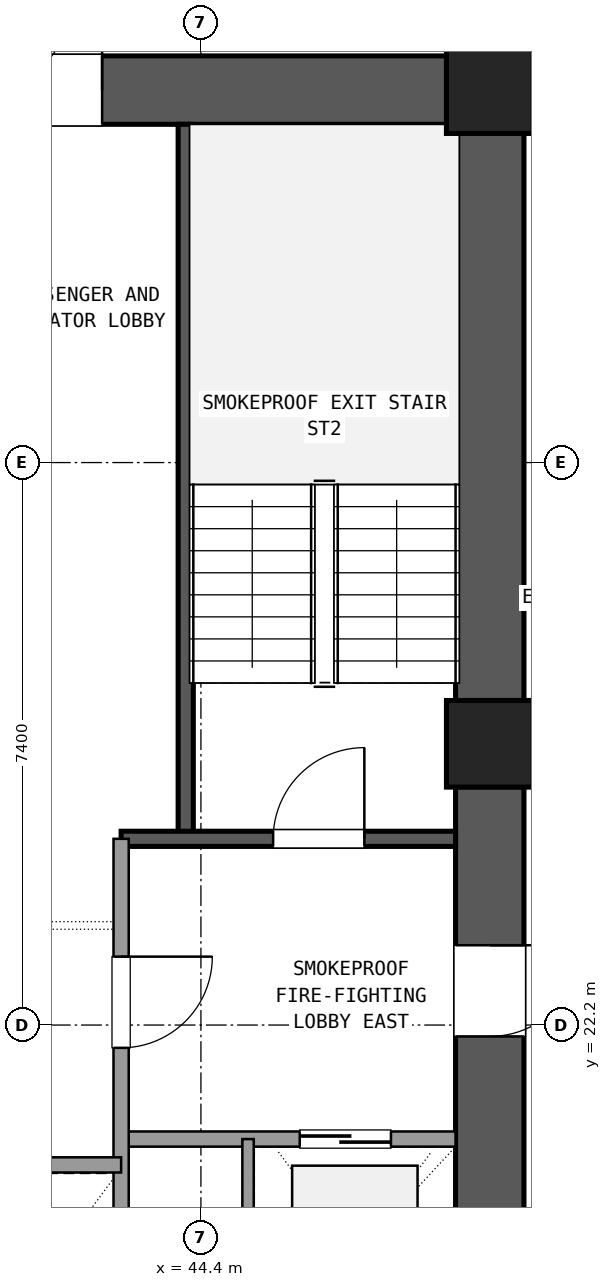
"""IFC4 building model, lengths in metres.
Left out: names, types, materials, properties, quantities, classifications, styles, units other than length and angle.
Written with IfcOpenShell. Run it as: python <this file> out.ifc"""

import sys

from ifc_helpers import new_model, si_unit, direction, frame, frame_2d, origin, origin_2d, place, context, subcontext, project, spatial, rectangle, extrude, element, fill, save


model = new_model("IFC4")
c1 = context("Model", 3, precision=1e-05, world=origin(), true_north=direction((0.0, 1.0)))
c2 = subcontext(c1, "Body", "Model", "MODEL_VIEW")
j1 = project(units=[si_unit("LENGTHUNIT", "METRE"), si_unit("PLANEANGLEUNIT", "RADIAN")], contexts=[c1])
p1 = place(None, origin())
s1 = spatial("IfcSite", under=j1, at=p1, CompositionType="ELEMENT")
p2 = place(p1, origin())
s2 = spatial("IfcBuilding", under=s1, at=p2, CompositionType="ELEMENT")
p3 = place(p2, frame((0.0, 0.0, 63.54)))
s3 = spatial("IfcBuildingStorey", under=s2, at=p3, CompositionType="ELEMENT", Elevation=63.54)
for number, where, z_axis, x_axis in (
    (1, (48.2, 25.9, 0.0), (0.0, 0.0, 1.0), (1.0, 0.0, 0.0)),
    (2, (48.2, 34.5, 0.0), (0.0, 0.0, 1.0), (1.0, 0.0, 0.0)),
):
    element("IfcColumn", number, at=place(p3, frame(where, z_axis=z_axis, x_axis=x_axis)), inside=s3, PredefinedType="COLUMN", context=c2, shape_type="SweptSolid", body=[
        extrude(rectangle(XDim=1.14, YDim=1.14, at=origin_2d()), origin(), (0.0, 0.0, 1.0), 3.6),
    ])
p4 = place(p3, frame((48.2, 17.865, 0.0), z_axis=(0.0, 0.0, 1.0), x_axis=(0.0, 1.0, 0.0)))
e3 = element("IfcWall", 3, at=p4, inside=s3, PredefinedType="SHEAR", context=c2, shape_type="SweptSolid", body=[
    extrude(rectangle(XDim=7.47, YDim=0.9, at=frame_2d((3.735, 0.0))), origin(), (0.0, 0.0, 1.0), 3.32),
])
p5 = place(p4, frame((4.185, 0.0, 0.0)))
e4 = element("IfcOpeningElement", 4, at=p5, cuts=e3, PredefinedType="OPENING", context=c2, shape_type="SweptSolid", body=[
    extrude(rectangle(XDim=1.2, YDim=2.15, at=frame_2d((0.6, 1.075))), frame((0.0, 0.46, 0.0), z_axis=(0.0, -1.0, 0.0), x_axis=(1.0, 0.0, 0.0)), (0.0, 0.0, 1.0), 0.92),
])
p6 = place(p3, frame((48.2, 26.465, 0.0), z_axis=(0.0, 0.0, 1.0), x_axis=(0.0, 1.0, 0.0)))
e5 = element("IfcWall", 5, at=p6, inside=s3, PredefinedType="SHEAR", context=c2, shape_type="SweptSolid", body=[
    extrude(rectangle(XDim=7.47, YDim=0.9, at=frame_2d((3.735, 0.0))), origin(), (0.0, 0.0, 1.0), 3.32),
])
p7 = place(p3, frame((47.635, 34.5, 0.0), z_axis=(0.0, 0.0, 1.0), x_axis=(-1.0, 0.0, 0.0)))
e6 = element("IfcWall", 6, at=p7, inside=s3, PredefinedType="SHEAR", context=c2, shape_type="SweptSolid", body=[
    extrude(rectangle(XDim=10.07, YDim=0.9, at=frame_2d((5.035, 0.0))), origin(), (0.0, 0.0, 1.0), 3.32),
])
p8 = place(p7, frame((4.535, 0.0, 0.0)))
e7 = element("IfcOpeningElement", 7, at=p8, cuts=e6, PredefinedType="OPENING", context=c2, shape_type="SweptSolid", body=[
    extrude(rectangle(XDim=1.6, YDim=2.2, at=frame_2d((0.8, 1.1))), frame((0.0, 0.46, 0.0), z_axis=(0.0, -1.0, 0.0), x_axis=(1.0, 0.0, 0.0)), (0.0, 0.0, 1.0), 0.92),
])
p9 = place(p3, frame((44.2, 24.65, 0.0), z_axis=(0.0, 0.0, 1.0), x_axis=(0.0, 1.0, 0.0)))
e8 = element("IfcWall", 8, at=p9, inside=s3, PredefinedType="SHEAR", context=c2, shape_type="SweptSolid", body=[
    extrude(rectangle(XDim=9.4, YDim=0.2, at=frame_2d((4.7, 0.0))), origin(), (0.0, 0.0, 1.0), 3.32),
])
p10 = place(p3, frame((43.35, 24.65, 0.0), z_axis=(0.0, 0.0, 1.0), x_axis=(1.0, 0.0, 0.0)))
e9 = element("IfcWall", 9, at=p10, inside=s3, PredefinedType="SHEAR", context=c2, shape_type="SweptSolid", body=[
    extrude(rectangle(XDim=4.4, YDim=0.2, at=frame_2d((2.2, 0.0))), origin(), (0.0, 0.0, 1.0), 3.32),
])
p11 = place(p10, frame((2.0, 0.0, 0.0)))
e10 = element("IfcOpeningElement", 10, at=p11, cuts=e9, PredefinedType="OPENING", context=c2, shape_type="SweptSolid", body=[
    extrude(rectangle(XDim=1.2, YDim=2.15, at=frame_2d((0.6, 1.075))), frame((0.0, 0.11, 0.0), z_axis=(0.0, -1.0, 0.0), x_axis=(1.0, 0.0, 0.0)), (0.0, 0.0, 1.0), 0.22),
])
p12 = place(p3, frame((43.35, 20.7, 0.0), z_axis=(0.0, 0.0, 1.0), x_axis=(1.0, 0.0, 0.0)))
e11 = element("IfcWall", 11, at=p12, inside=s3, PredefinedType="SOLIDWALL", context=c2, shape_type="SweptSolid", body=[
    extrude(rectangle(XDim=4.4, YDim=0.2, at=frame_2d((2.2, 0.0))), origin(), (0.0, 0.0, 1.0), 2.61),
])
p13 = place(p12, frame((2.35, 0.0, 0.0)))
e12 = element("IfcOpeningElement", 12, at=p13, cuts=e11, PredefinedType="OPENING", context=c2, shape_type="SweptSolid", body=[
    extrude(rectangle(XDim=1.2, YDim=2.15, at=frame_2d((0.6, 1.075))), frame((0.0, 0.11, 0.0), z_axis=(0.0, -1.0, 0.0), x_axis=(1.0, 0.0, 0.0)), (0.0, 0.0, 1.0), 0.22),
])
p14 = place(p3, frame((43.35, 17.75, 0.0), z_axis=(0.0, 0.0, 1.0), x_axis=(0.0, 1.0, 0.0)))
e13 = element("IfcWall", 13, at=p14, inside=s3, PredefinedType="SOLIDWALL", context=c2, shape_type="SweptSolid", body=[
    extrude(rectangle(XDim=6.9, YDim=0.2, at=frame_2d((3.45, 0.0))), origin(), (0.0, 0.0, 1.0), 2.61),
])
p15 = place(p14, frame((4.15, 0.0, 0.0)))
e14 = element("IfcOpeningElement", 14, at=p15, cuts=e13, PredefinedType="OPENING", context=c2, shape_type="SweptSolid", body=[
    extrude(rectangle(XDim=1.2, YDim=2.15, at=frame_2d((0.6, 1.075))), frame((0.0, 0.11, 0.0), z_axis=(0.0, -1.0, 0.0), x_axis=(1.0, 0.0, 0.0)), (0.0, 0.0, 1.0), 0.22),
])
p16 = place(p3, frame((45.02, 17.75, 0.0), z_axis=(0.0, 0.0, 1.0), x_axis=(0.0, 1.0, 0.0)))
e15 = element("IfcWall", 15, at=p16, inside=s3, PredefinedType="PARTITIONING", context=c2, shape_type="SweptSolid", body=[
    extrude(rectangle(XDim=2.95, YDim=0.15, at=frame_2d((1.475, 0.0))), origin(), (0.0, 0.0, 1.0), 2.61),
])
p17 = place(p3, frame((37.25, 20.36, 0.0), z_axis=(0.0, 0.0, 1.0), x_axis=(1.0, 0.0, 0.0)))
e16 = element("IfcWall", 16, at=p17, inside=s3, PredefinedType="SOLIDWALL", context=c2, shape_type="SweptSolid", body=[
    extrude(rectangle(XDim=6.1, YDim=0.2, at=frame_2d((3.05, 0.0))), origin(), (0.0, 0.0, 1.0), 2.61),
])
p18 = place(p11, origin())
e17 = element("IfcDoor", 17, at=p18, inside=s3, OperationType="SINGLE_SWING_RIGHT", PredefinedType="DOOR", context=c2, shape_type="SweptSolid", body=[
    extrude(rectangle(XDim=1.2, YDim=2.15, at=frame_2d((0.6, 1.075))), frame((0.0, 0.025, 0.0), z_axis=(0.0, -1.0, 0.0), x_axis=(1.0, 0.0, 0.0)), (0.0, 0.0, 1.0), 0.05),
])
fill(e10, e17)
p19 = place(p13, origin())
e18 = element("IfcDoor", 18, at=p19, inside=s3, OperationType="SLIDING_TO_RIGHT", PredefinedType="DOOR", context=c2, shape_type="SweptSolid", body=[
    extrude(rectangle(XDim=1.2, YDim=2.15, at=frame_2d((0.6, 1.075))), frame((0.0, 0.025, 0.0), z_axis=(0.0, -1.0, 0.0), x_axis=(1.0, 0.0, 0.0)), (0.0, 0.0, 1.0), 0.05),
])
fill(e12, e18)
p20 = place(p15, frame((1.2, 0.0, 0.0), z_axis=(0.0, 0.0, 1.0), x_axis=(-1.0, 0.0, 0.0)))
e19 = element("IfcDoor", 19, at=p20, inside=s3, OperationType="SINGLE_SWING_RIGHT", PredefinedType="DOOR", context=c2, shape_type="SweptSolid", body=[
    extrude(rectangle(XDim=1.2, YDim=2.15, at=frame_2d((0.6, 1.075))), frame((0.0, 0.025, 0.0), z_axis=(0.0, -1.0, 0.0), x_axis=(1.0, 0.0, 0.0)), (0.0, 0.0, 1.0), 0.05),
])
fill(e14, e19)
p21 = place(p5, frame((1.2, 0.0, 0.0), z_axis=(0.0, 0.0, 1.0), x_axis=(-1.0, 0.0, 0.0)))
e20 = element("IfcDoor", 20, at=p21, inside=s3, OperationType="SINGLE_SWING_RIGHT", PredefinedType="DOOR", context=c2, shape_type="SweptSolid", body=[
    extrude(rectangle(XDim=1.2, YDim=2.15, at=frame_2d((0.6, 1.075))), frame((0.0, 0.025, 0.0), z_axis=(0.0, -1.0, 0.0), x_axis=(1.0, 0.0, 0.0)), (0.0, 0.0, 1.0), 0.05),
])
fill(e4, e20)
p22 = place(p8, frame((1.6, 0.0, 0.0), z_axis=(0.0, 0.0, 1.0), x_axis=(-1.0, 0.0, 0.0)))
e21 = element("IfcDoor", 21, at=p22, inside=s3, OperationType="DOUBLE_DOOR_SINGLE_SWING", PredefinedType="DOOR", context=c2, shape_type="SweptSolid", body=[
    extrude(rectangle(XDim=1.6, YDim=2.2, at=frame_2d((0.8, 1.1))), frame((0.0, 0.025, 0.0), z_axis=(0.0, -1.0, 0.0), x_axis=(1.0, 0.0, 0.0)), (0.0, 0.0, 1.0), 0.05),
])
fill(e7, e21)
save(model, sys.argv[1])
